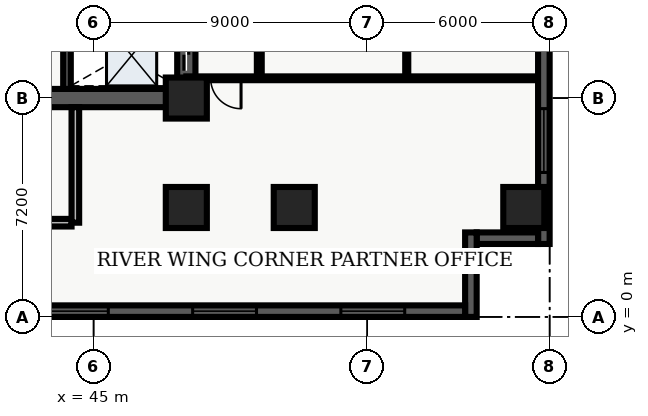
"""IFC4 building model, lengths in metres.
Left out: names, types, materials, properties, quantities, classifications, styles, units other than length and angle.
Written with IfcOpenShell. Run it as: python <this file> out.ifc"""

import sys

from ifc_helpers import new_model, entity, si_unit, converted_unit, direction, frame, origin_with_axes, origin_2d_with_axis, place, context, subcontext, project, spatial, polyline, rectangle, outline, extrude, element, fill, save


model = new_model("IFC4")
c1 = context("Model", 3, precision=1e-05, world=origin_with_axes(), true_north=direction((0.0, 1.0)))
c2 = subcontext(c1, "Body", "Model", "MODEL_VIEW")
j1 = project(units=[si_unit("LENGTHUNIT", "METRE"), converted_unit("PLANEANGLEUNIT", "DEGREE", entity("IfcPlaneAngleMeasure", 0.017), si_unit("PLANEANGLEUNIT", "RADIAN"), dimensions=[0, 0, 0, 0, 0, 0, 0])], contexts=[c1])
p1 = place(None, origin_with_axes())
s1 = spatial("IfcSite", under=j1, at=p1, CompositionType="ELEMENT")
p2 = place(p1, origin_with_axes())
s2 = spatial("IfcBuilding", under=s1, at=p2, CompositionType="ELEMENT")
p3 = place(p2, frame((0.0, 0.0, 28.8), z_axis=(0.0, 0.0, 1.0), x_axis=(1.0, 0.0, 0.0)))
s3 = spatial("IfcBuildingStorey", under=s2, at=p3, CompositionType="ELEMENT", Elevation=28.8)
p4 = place(p3, frame((40.2, 7.2, 0.0), z_axis=(0.0, 0.0, 1.0), x_axis=(1.0, 0.0, 0.0)))
e1 = element("IfcWall", 1, at=p4, inside=s3, PredefinedType="SHEAR", context=c2, shape_type="SweptSolid", body=[
    extrude(outline(polyline([(0.0, -0.3), (7.85, -0.3), (7.85, 0.3), (0.0, 0.3), (0.0, -0.3)])), origin_with_axes(), (0.0, 0.0, 1.0), 3.66),
])
p5 = place(p4, frame((2.175, 0.0, 0.0), z_axis=(0.0, 0.0, 1.0), x_axis=(1.0, 0.0, 0.0)))
e2 = element("IfcOpeningElement", 2, at=p5, cuts=e1, PredefinedType="OPENING", context=c2, shape_type="SweptSolid", body=[
    extrude(rectangle(XDim=1.05, YDim=0.62, at=origin_2d_with_axis()), origin_with_axes(), (0.0, 0.0, 1.0), 2.15),
])
p6 = place(p3, frame((48.05, 7.2, 0.0), z_axis=(0.0, 0.0, 1.0), x_axis=(0.0, 1.0, 0.0)))
e3 = element("IfcWall", 3, at=p6, inside=s3, PredefinedType="SHEAR", context=c2, shape_type="SweptSolid", body=[
    extrude(outline(polyline([(0.0, -0.3), (15.6, -0.3), (15.6, 0.3), (0.0, 0.3), (0.0, -0.3)])), origin_with_axes(), (0.0, 0.0, 1.0), 3.66),
])
p7 = place(p6, frame((1.425, 0.0, 0.0), z_axis=(0.0, 0.0, 1.0), x_axis=(1.0, 0.0, 0.0)))
e4 = element("IfcOpeningElement", 4, at=p7, cuts=e3, PredefinedType="OPENING", context=c2, shape_type="SweptSolid", body=[
    extrude(rectangle(XDim=1.05, YDim=0.62, at=origin_2d_with_axis()), origin_with_axes(), (0.0, 0.0, 1.0), 2.15),
])
p8 = place(p6, frame((3.475, 0.0, 0.0), z_axis=(0.0, 0.0, 1.0), x_axis=(1.0, 0.0, 0.0)))
e5 = element("IfcOpeningElement", 5, at=p8, cuts=e3, PredefinedType="OPENING", context=c2, shape_type="SweptSolid", body=[
    extrude(rectangle(XDim=1.05, YDim=0.62, at=origin_2d_with_axis()), origin_with_axes(), (0.0, 0.0, 1.0), 2.15),
])
p9 = place(p6, frame((5.625, 0.0, 0.0), z_axis=(0.0, 0.0, 1.0), x_axis=(1.0, 0.0, 0.0)))
e6 = element("IfcOpeningElement", 6, at=p9, cuts=e3, PredefinedType="OPENING", context=c2, shape_type="SweptSolid", body=[
    extrude(rectangle(XDim=0.95, YDim=0.62, at=origin_2d_with_axis()), origin_with_axes(), (0.0, 0.0, 1.0), 2.15),
])
p10 = place(p3, frame((44.125, 7.5, 0.0), z_axis=(0.0, 0.0, 1.0), x_axis=(0.0, 1.0, 0.0)))
e7 = element("IfcWall", 7, at=p10, inside=s3, PredefinedType="SHEAR", context=c2, shape_type="SweptSolid", body=[
    extrude(outline(polyline([(0.0, -0.125), (15.0, -0.125), (15.0, 0.125), (0.0, 0.125), (0.0, -0.125)])), origin_with_axes(), (0.0, 0.0, 1.0), 3.66),
])
p11 = place(p3, frame((40.325, 3.1, 0.0), z_axis=(0.0, 0.0, 1.0), x_axis=(1.0, 0.0, 0.0)))
e8 = element("IfcWall", 8, at=p11, inside=s3, PredefinedType="SOLIDWALL", context=c2, shape_type="SweptSolid", body=[
    extrude(outline(polyline([(0.0, -0.125), (3.95, -0.125), (3.95, 0.125), (0.0, 0.125), (0.0, -0.125)])), origin_with_axes(), (0.0, 0.0, 1.0), 2.7),
])
p12 = place(p3, frame((44.4, 3.1, 0.0), z_axis=(0.0, 0.0, 1.0), x_axis=(0.0, 1.0, 0.0)))
e9 = element("IfcWall", 9, at=p12, inside=s3, PredefinedType="SOLIDWALL", context=c2, shape_type="SweptSolid", body=[
    extrude(outline(polyline([(0.0, -0.125), (3.8, -0.125), (3.8, 0.125), (0.0, 0.125), (0.0, -0.125)])), origin_with_axes(), (0.0, 0.0, 1.0), 2.7),
])
for number, where, z_axis, x_axis in (
    (10, (48.05, 3.6, 0.0), (0.0, 0.0, 1.0), (1.0, 0.0, 0.0)),
    (11, (48.05, 7.2, 0.0), (0.0, 0.0, 1.0), (1.0, 0.0, 0.0)),
    (12, (51.6, 3.6, 0.0), (0.0, 0.0, 1.0), (1.0, 0.0, 0.0)),
    (13, (59.15, 3.6, 0.0), (0.0, 0.0, 1.0), (1.0, 0.0, 0.0)),
):
    element("IfcColumn", number, at=place(p3, frame(where, z_axis=z_axis, x_axis=x_axis)), inside=s3, PredefinedType="COLUMN", context=c2, shape_type="SweptSolid", body=[
        extrude(rectangle(XDim=1.35, YDim=1.35, at=origin_2d_with_axis()), origin_with_axes(), (0.0, 0.0, 1.0), 3.9),
    ])
p13 = place(p3, frame((50.45, 7.85, 0.0), z_axis=(0.0, 0.0, 1.0), x_axis=(0.0, 1.0, 0.0)))
e14 = element("IfcWall", 14, at=p13, inside=s3, PredefinedType="PARTITIONING", context=c2, shape_type="SweptSolid", body=[
    extrude(outline(polyline([(0.0, -0.08), (18.8, -0.08), (18.8, 0.08), (0.0, 0.08), (0.0, -0.08)])), origin_with_axes(), (0.0, 0.0, 1.0), 2.7),
])
p14 = place(p13, frame((4.564, 0.0, 0.0), z_axis=(0.0, 0.0, 1.0), x_axis=(1.0, 0.0, 0.0)))
e15 = element("IfcOpeningElement", 15, at=p14, cuts=e14, PredefinedType="OPENING", context=c2, shape_type="SweptSolid", body=[
    extrude(rectangle(XDim=1.0, YDim=0.18, at=origin_2d_with_axis()), origin_with_axes(), (0.0, 0.0, 1.0), 2.15),
])
p15 = place(p13, frame((11.541, 0.0, 0.0), z_axis=(0.0, 0.0, 1.0), x_axis=(1.0, 0.0, 0.0)))
e16 = element("IfcOpeningElement", 16, at=p15, cuts=e14, PredefinedType="OPENING", context=c2, shape_type="SweptSolid", body=[
    extrude(rectangle(XDim=1.0, YDim=0.18, at=origin_2d_with_axis()), origin_with_axes(), (0.0, 0.0, 1.0), 2.15),
])
p16 = place(p13, frame((14.125, 0.0, 0.0), z_axis=(0.0, 0.0, 1.0), x_axis=(1.0, 0.0, 0.0)))
e17 = element("IfcOpeningElement", 17, at=p16, cuts=e14, PredefinedType="OPENING", context=c2, shape_type="SweptSolid", body=[
    extrude(rectangle(XDim=1.0, YDim=0.18, at=origin_2d_with_axis()), origin_with_axes(), (0.0, 0.0, 1.0), 2.15),
])
p17 = place(p3, frame((59.64, 7.85, 0.0), z_axis=(0.0, 0.0, 1.0), x_axis=(-1.0, 0.0, 0.0)))
e18 = element("IfcWall", 18, at=p17, inside=s3, PredefinedType="PARTITIONING", context=c2, shape_type="SweptSolid", body=[
    extrude(outline(polyline([(0.0, -0.062), (11.59, -0.062), (11.59, 0.062), (0.0, 0.062), (0.0, -0.062)])), origin_with_axes(), (0.0, 0.0, 1.0), 2.7),
])
p18 = place(p17, frame((10.29, 0.0, 0.0), z_axis=(0.0, 0.0, 1.0), x_axis=(1.0, 0.0, 0.0)))
e19 = element("IfcOpeningElement", 19, at=p18, cuts=e18, PredefinedType="OPENING", context=c2, shape_type="SweptSolid", body=[
    extrude(rectangle(XDim=1.0, YDim=0.145, at=origin_2d_with_axis()), origin_with_axes(), (0.0, 0.0, 1.0), 2.15),
])
p19 = place(p3, frame((55.3, 7.98, 0.0), z_axis=(0.0, 0.0, 1.0), x_axis=(0.0, 1.0, 0.0)))
e20 = element("IfcWall", 20, at=p19, inside=s3, PredefinedType="PARTITIONING", context=c2, shape_type="SweptSolid", body=[
    extrude(outline(polyline([(0.0, -0.05), (18.54, -0.05), (18.54, 0.05), (0.0, 0.05), (0.0, -0.05)])), origin_with_axes(), (0.0, 0.0, 1.0), 2.7),
])
p20 = place(p19, frame((4.434, 0.0, 0.0), z_axis=(0.0, 0.0, 1.0), x_axis=(1.0, 0.0, 0.0)))
e21 = element("IfcOpeningElement", 21, at=p20, cuts=e20, PredefinedType="OPENING", context=c2, shape_type="SweptSolid", body=[
    extrude(rectangle(XDim=0.95, YDim=0.12, at=origin_2d_with_axis()), origin_with_axes(), (0.0, 0.0, 1.0), 2.15),
])
p21 = place(p19, frame((11.132, 0.0, 0.0), z_axis=(0.0, 0.0, 1.0), x_axis=(1.0, 0.0, 0.0)))
e22 = element("IfcOpeningElement", 22, at=p21, cuts=e20, PredefinedType="OPENING", context=c2, shape_type="SweptSolid", body=[
    extrude(rectangle(XDim=0.95, YDim=0.12, at=origin_2d_with_axis()), origin_with_axes(), (0.0, 0.0, 1.0), 2.15),
])
p22 = place(p19, frame((15.967, 0.0, 0.0), z_axis=(0.0, 0.0, 1.0), x_axis=(1.0, 0.0, 0.0)))
e23 = element("IfcOpeningElement", 23, at=p22, cuts=e20, PredefinedType="OPENING", context=c2, shape_type="SweptSolid", body=[
    extrude(rectangle(XDim=0.95, YDim=0.12, at=origin_2d_with_axis()), origin_with_axes(), (0.0, 0.0, 1.0), 2.15),
])
p23 = place(p3, frame((59.81, 26.02, 0.0), z_axis=(0.0, 0.0, 1.0), x_axis=(0.0, -1.0, 0.0)))
e24 = element("IfcWall", 24, at=p23, inside=s3, PredefinedType="SOLIDWALL", context=c2, shape_type="SweptSolid", body=[
    extrude(outline(polyline([(0.0, -0.19), (23.62, -0.19), (23.62, 0.19), (0.0, 0.19), (0.0, -0.19)])), origin_with_axes(), (0.0, 0.0, 1.0), 3.66),
])
p24 = place(p23, frame((20.218, 0.0, 0.45), z_axis=(0.0, 0.0, 1.0), x_axis=(1.0, 0.0, 0.0)))
e25 = element("IfcOpeningElement", 25, at=p24, cuts=e24, PredefinedType="OPENING", context=c2, shape_type="SweptSolid", body=[
    extrude(rectangle(XDim=2.1, YDim=0.4, at=origin_2d_with_axis()), origin_with_axes(), (0.0, 0.0, 1.0), 2.2),
])
p25 = place(p3, frame((59.62, 2.59, 0.0), z_axis=(0.0, 0.0, 1.0), x_axis=(-1.0, 0.0, 0.0)))
e26 = element("IfcWall", 26, at=p25, inside=s3, PredefinedType="SOLIDWALL", context=c2, shape_type="SweptSolid", body=[
    extrude(outline(polyline([(0.0, -0.19), (2.02, -0.19), (2.02, 0.19), (0.0, 0.19), (0.0, -0.19)])), origin_with_axes(), (0.0, 0.0, 1.0), 3.66),
])
p26 = place(p3, frame((57.41, 2.78, 0.0), z_axis=(0.0, 0.0, 1.0), x_axis=(0.0, -1.0, 0.0)))
e27 = element("IfcWall", 27, at=p26, inside=s3, PredefinedType="SOLIDWALL", context=c2, shape_type="SweptSolid", body=[
    extrude(outline(polyline([(0.0, -0.19), (2.78, -0.19), (2.78, 0.19), (0.0, 0.19), (0.0, -0.19)])), origin_with_axes(), (0.0, 0.0, 1.0), 3.66),
])
p27 = place(p3, frame((57.22, 0.19, 0.0), z_axis=(0.0, 0.0, 1.0), x_axis=(-1.0, 0.0, 0.0)))
e28 = element("IfcWall", 28, at=p27, inside=s3, PredefinedType="SOLIDWALL", context=c2, shape_type="SweptSolid", body=[
    extrude(outline(polyline([(0.0, -0.19), (54.82, -0.19), (54.82, 0.19), (0.0, 0.19), (0.0, -0.19)])), origin_with_axes(), (0.0, 0.0, 1.0), 3.66),
])
p28 = place(p27, frame((3.037, 0.0, 0.45), z_axis=(0.0, 0.0, 1.0), x_axis=(1.0, 0.0, 0.0)))
e29 = element("IfcOpeningElement", 29, at=p28, cuts=e28, PredefinedType="OPENING", context=c2, shape_type="SweptSolid", body=[
    extrude(rectangle(XDim=2.1, YDim=0.4, at=origin_2d_with_axis()), origin_with_axes(), (0.0, 0.0, 1.0), 2.2),
])
p29 = place(p27, frame((7.912, 0.0, 0.45), z_axis=(0.0, 0.0, 1.0), x_axis=(1.0, 0.0, 0.0)))
e30 = element("IfcOpeningElement", 30, at=p29, cuts=e28, PredefinedType="OPENING", context=c2, shape_type="SweptSolid", body=[
    extrude(rectangle(XDim=2.1, YDim=0.4, at=origin_2d_with_axis()), origin_with_axes(), (0.0, 0.0, 1.0), 2.2),
])
p30 = place(p27, frame((12.786, 0.0, 0.45), z_axis=(0.0, 0.0, 1.0), x_axis=(1.0, 0.0, 0.0)))
e31 = element("IfcOpeningElement", 31, at=p30, cuts=e28, PredefinedType="OPENING", context=c2, shape_type="SweptSolid", body=[
    extrude(rectangle(XDim=2.1, YDim=0.4, at=origin_2d_with_axis()), origin_with_axes(), (0.0, 0.0, 1.0), 2.2),
])
p31 = place(p27, frame((17.661, 0.0, 0.45), z_axis=(0.0, 0.0, 1.0), x_axis=(1.0, 0.0, 0.0)))
e32 = element("IfcOpeningElement", 32, at=p31, cuts=e28, PredefinedType="OPENING", context=c2, shape_type="SweptSolid", body=[
    extrude(rectangle(XDim=2.1, YDim=0.4, at=origin_2d_with_axis()), origin_with_axes(), (0.0, 0.0, 1.0), 2.2),
])
p32 = place(p27, frame((22.535, 0.0, 0.45), z_axis=(0.0, 0.0, 1.0), x_axis=(1.0, 0.0, 0.0)))
e33 = element("IfcOpeningElement", 33, at=p32, cuts=e28, PredefinedType="OPENING", context=c2, shape_type="SweptSolid", body=[
    extrude(rectangle(XDim=2.1, YDim=0.4, at=origin_2d_with_axis()), origin_with_axes(), (0.0, 0.0, 1.0), 2.2),
])
p33 = place(p27, frame((27.41, 0.0, 0.45), z_axis=(0.0, 0.0, 1.0), x_axis=(1.0, 0.0, 0.0)))
e34 = element("IfcOpeningElement", 34, at=p33, cuts=e28, PredefinedType="OPENING", context=c2, shape_type="SweptSolid", body=[
    extrude(rectangle(XDim=2.1, YDim=0.4, at=origin_2d_with_axis()), origin_with_axes(), (0.0, 0.0, 1.0), 2.2),
])
p34 = place(p27, frame((32.285, 0.0, 0.45), z_axis=(0.0, 0.0, 1.0), x_axis=(1.0, 0.0, 0.0)))
e35 = element("IfcOpeningElement", 35, at=p34, cuts=e28, PredefinedType="OPENING", context=c2, shape_type="SweptSolid", body=[
    extrude(rectangle(XDim=2.1, YDim=0.4, at=origin_2d_with_axis()), origin_with_axes(), (0.0, 0.0, 1.0), 2.2),
])
p35 = place(p27, frame((37.159, 0.0, 0.45), z_axis=(0.0, 0.0, 1.0), x_axis=(1.0, 0.0, 0.0)))
e36 = element("IfcOpeningElement", 36, at=p35, cuts=e28, PredefinedType="OPENING", context=c2, shape_type="SweptSolid", body=[
    extrude(rectangle(XDim=2.1, YDim=0.4, at=origin_2d_with_axis()), origin_with_axes(), (0.0, 0.0, 1.0), 2.2),
])
p36 = place(p27, frame((42.034, 0.0, 0.45), z_axis=(0.0, 0.0, 1.0), x_axis=(1.0, 0.0, 0.0)))
e37 = element("IfcOpeningElement", 37, at=p36, cuts=e28, PredefinedType="OPENING", context=c2, shape_type="SweptSolid", body=[
    extrude(rectangle(XDim=2.1, YDim=0.4, at=origin_2d_with_axis()), origin_with_axes(), (0.0, 0.0, 1.0), 2.2),
])
p37 = place(p27, frame((51.783, 0.0, 0.45), z_axis=(0.0, 0.0, 1.0), x_axis=(1.0, 0.0, 0.0)))
e38 = element("IfcOpeningElement", 38, at=p37, cuts=e28, PredefinedType="OPENING", context=c2, shape_type="SweptSolid", body=[
    extrude(rectangle(XDim=2.1, YDim=0.4, at=origin_2d_with_axis()), origin_with_axes(), (0.0, 0.0, 1.0), 2.2),
])
p38 = place(p6, frame((1.425, 0.0, 0.0), z_axis=(0.0, 0.0, 1.0), x_axis=(1.0, 0.0, 0.0)))
e39 = element("IfcDoor", 39, at=p38, inside=s3, OperationType="SLIDING_TO_LEFT", PredefinedType="DOOR", context=c2, shape_type="SweptSolid", body=[
    extrude(rectangle(XDim=1.05, YDim=0.09, at=origin_2d_with_axis()), origin_with_axes(), (0.0, 0.0, 1.0), 2.15),
])
fill(e4, e39)
p39 = place(p17, frame((10.29, 0.0, 0.0), z_axis=(0.0, 0.0, 1.0), x_axis=(1.0, 0.0, 0.0)))
e40 = element("IfcDoor", 40, at=p39, inside=s3, OperationType="SINGLE_SWING_LEFT", PredefinedType="DOOR", context=c2, shape_type="SweptSolid", body=[
    extrude(rectangle(XDim=1.0, YDim=0.075, at=origin_2d_with_axis()), origin_with_axes(), (0.0, 0.0, 1.0), 2.15),
])
fill(e19, e40)
p40 = place(p23, frame((20.218, 0.0, 0.45), z_axis=(0.0, 0.0, 1.0), x_axis=(1.0, 0.0, 0.0)))
e41 = element("IfcWindow", 41, at=p40, inside=s3, PredefinedType="WINDOW", context=c2, shape_type="SweptSolid", body=[
    extrude(rectangle(XDim=2.1, YDim=0.09, at=origin_2d_with_axis()), origin_with_axes(), (0.0, 0.0, 1.0), 2.2),
])
fill(e25, e41)
p41 = place(p27, frame((3.037, 0.0, 0.45), z_axis=(0.0, 0.0, 1.0), x_axis=(1.0, 0.0, 0.0)))
e42 = element("IfcWindow", 42, at=p41, inside=s3, PredefinedType="WINDOW", context=c2, shape_type="SweptSolid", body=[
    extrude(rectangle(XDim=2.1, YDim=0.09, at=origin_2d_with_axis()), origin_with_axes(), (0.0, 0.0, 1.0), 2.2),
])
fill(e29, e42)
p42 = place(p27, frame((7.912, 0.0, 0.45), z_axis=(0.0, 0.0, 1.0), x_axis=(1.0, 0.0, 0.0)))
e43 = element("IfcWindow", 43, at=p42, inside=s3, PredefinedType="WINDOW", context=c2, shape_type="SweptSolid", body=[
    extrude(rectangle(XDim=2.1, YDim=0.09, at=origin_2d_with_axis()), origin_with_axes(), (0.0, 0.0, 1.0), 2.2),
])
fill(e30, e43)
p43 = place(p27, frame((12.786, 0.0, 0.45), z_axis=(0.0, 0.0, 1.0), x_axis=(1.0, 0.0, 0.0)))
e44 = element("IfcWindow", 44, at=p43, inside=s3, PredefinedType="WINDOW", context=c2, shape_type="SweptSolid", body=[
    extrude(rectangle(XDim=2.1, YDim=0.09, at=origin_2d_with_axis()), origin_with_axes(), (0.0, 0.0, 1.0), 2.2),
])
fill(e31, e44)
save(model, sys.argv[1])
